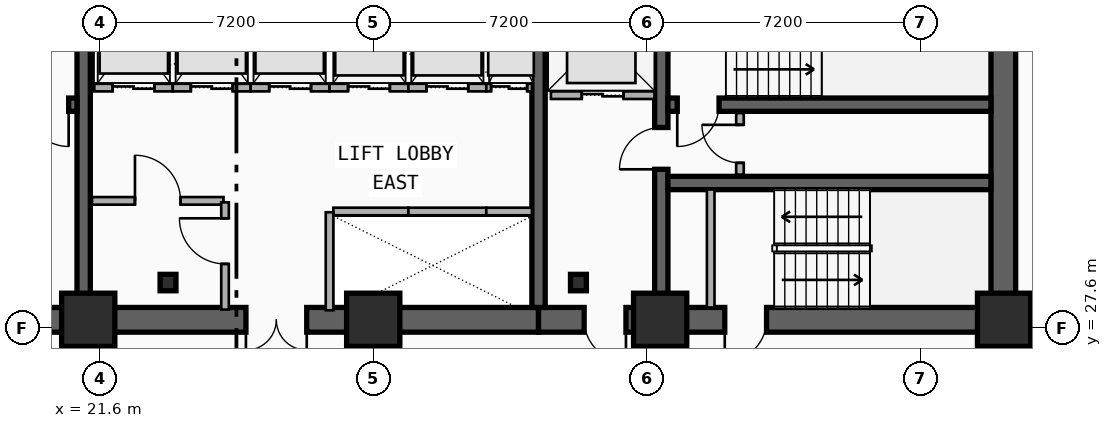
"""IFC4 building model, lengths in metres.
Left out: names, types, materials, properties, quantities, classifications, styles, units other than length and angle.
Written with IfcOpenShell. Run it as: python <this file> out.ifc"""

import sys

from ifc_helpers import new_model, si_unit, direction, frame, frame_2d, origin, origin_2d, place, context, subcontext, project, spatial, rectangle, i_section, extrude, element, fill, save


model = new_model("IFC4")
c1 = context("Model", 3, precision=1e-05, world=origin(), true_north=direction((0.0, 1.0)))
c2 = subcontext(c1, "Body", "Model", "MODEL_VIEW")
j1 = project(units=[si_unit("LENGTHUNIT", "METRE"), si_unit("PLANEANGLEUNIT", "RADIAN")], contexts=[c1])
p1 = place(None, origin())
s1 = spatial("IfcSite", under=j1, at=p1, CompositionType="ELEMENT")
p2 = place(p1, origin())
s2 = spatial("IfcBuilding", under=s1, at=p2, CompositionType="ELEMENT")
p3 = place(p2, frame((0.0, 0.0, 86.3)))
s3 = spatial("IfcBuildingStorey", under=s2, at=p3, CompositionType="ELEMENT", Elevation=86.3)
p4 = place(p3, frame((21.18, 27.82, 0.0), z_axis=(0.0, 0.0, 1.0), x_axis=(-1.0, 0.0, 0.0)))
e1 = element("IfcWall", 1, at=p4, inside=s3, PredefinedType="SHEAR", context=c2, shape_type="SweptSolid", body=[
    extrude(rectangle(XDim=9.03, YDim=0.65, at=frame_2d((4.515, 0.0))), origin(), (0.0, 0.0, 1.0), 3.5),
])
p5 = place(p4, frame((2.68, 0.0, 0.0)))
e2 = element("IfcOpeningElement", 2, at=p5, cuts=e1, PredefinedType="OPENING", context=c2, shape_type="SweptSolid", body=[
    extrude(rectangle(XDim=1.1, YDim=2.15, at=frame_2d((0.55, 1.075))), frame((0.0, 0.335, 0.0), z_axis=(0.0, -1.0, 0.0), x_axis=(1.0, 0.0, 0.0)), (0.0, 0.0, 1.0), 0.67),
])
p6 = place(p3, frame((33.15, 27.82, 0.0), z_axis=(0.0, 0.0, 1.0), x_axis=(-1.0, 0.0, 0.0)))
e3 = element("IfcWall", 3, at=p6, inside=s3, PredefinedType="SHEAR", context=c2, shape_type="SweptSolid", body=[
    extrude(rectangle(XDim=11.97, YDim=0.65, at=frame_2d((5.985, 0.0))), origin(), (0.0, 0.0, 1.0), 3.5),
])
p7 = place(p6, frame((6.1, 0.0, 0.0)))
e4 = element("IfcOpeningElement", 4, at=p7, cuts=e3, PredefinedType="OPENING", context=c2, shape_type="SweptSolid", body=[
    extrude(rectangle(XDim=1.6, YDim=2.2, at=frame_2d((0.8, 1.1))), frame((0.0, 0.335, 0.0), z_axis=(0.0, -1.0, 0.0), x_axis=(1.0, 0.0, 0.0)), (0.0, 0.0, 1.0), 0.67),
])
p8 = place(p3, frame((45.38, 27.82, 0.0), z_axis=(0.0, 0.0, 1.0), x_axis=(-1.0, 0.0, 0.0)))
e5 = element("IfcWall", 5, at=p8, inside=s3, PredefinedType="SHEAR", context=c2, shape_type="SweptSolid", body=[
    extrude(rectangle(XDim=12.23, YDim=0.65, at=frame_2d((6.115, 0.0))), origin(), (0.0, 0.0, 1.0), 3.5),
])
p9 = place(p8, frame((9.93, 0.0, 0.0)))
e6 = element("IfcOpeningElement", 6, at=p9, cuts=e5, PredefinedType="OPENING", context=c2, shape_type="SweptSolid", body=[
    extrude(rectangle(XDim=1.1, YDim=2.15, at=frame_2d((0.55, 1.075))), frame((0.0, 0.335, 0.0), z_axis=(0.0, -1.0, 0.0), x_axis=(1.0, 0.0, 0.0)), (0.0, 0.0, 1.0), 0.67),
])
p10 = place(p8, frame((6.23, 0.0, 0.0)))
e7 = element("IfcOpeningElement", 7, at=p10, cuts=e5, PredefinedType="OPENING", context=c2, shape_type="SweptSolid", body=[
    extrude(rectangle(XDim=1.1, YDim=2.15, at=frame_2d((0.55, 1.075))), frame((0.0, 0.335, 0.0), z_axis=(0.0, -1.0, 0.0), x_axis=(1.0, 0.0, 0.0)), (0.0, 0.0, 1.0), 0.67),
])
p11 = place(p3, frame((45.38, 28.145, 0.0), z_axis=(0.0, 0.0, 1.0), x_axis=(0.0, 1.0, 0.0)))
e8 = element("IfcWall", 8, at=p11, inside=s3, PredefinedType="SHEAR", context=c2, shape_type="SweptSolid", body=[
    extrude(rectangle(XDim=8.58, YDim=0.65, at=frame_2d((4.29, 0.0))), origin(), (0.0, 0.0, 1.0), 3.5),
])
for number, where, z_axis, x_axis in (
    (9, (21.18, 28.145, 0.0), (0.0, 0.0, 1.0), (0.0, 1.0, 0.0)),
    (10, (33.15, 28.145, 0.0), (0.0, 0.0, 1.0), (0.0, 1.0, 0.0)),
):
    element("IfcWall", number, at=place(p3, frame(where, z_axis=z_axis, x_axis=x_axis)), inside=s3, PredefinedType="SHEAR", context=c2, shape_type="SweptSolid", body=[
        extrude(rectangle(XDim=8.58, YDim=0.35, at=frame_2d((4.29, 0.0))), origin(), (0.0, 0.0, 1.0), 3.5),
    ])
p12 = place(p3, frame((36.38, 28.145, 0.0), z_axis=(0.0, 0.0, 1.0), x_axis=(0.0, 1.0, 0.0)))
e11 = element("IfcWall", 11, at=p12, inside=s3, PredefinedType="SHEAR", context=c2, shape_type="SweptSolid", body=[
    extrude(rectangle(XDim=8.58, YDim=0.35, at=frame_2d((4.29, 0.0))), origin(), (0.0, 0.0, 1.0), 3.5),
])
p13 = place(p12, frame((3.635, 0.0, 0.0)))
e12 = element("IfcOpeningElement", 12, at=p13, cuts=e11, PredefinedType="OPENING", context=c2, shape_type="SweptSolid", body=[
    extrude(rectangle(XDim=1.1, YDim=2.15, at=frame_2d((0.55, 1.075))), frame((0.0, 0.185, 0.0), z_axis=(0.0, -1.0, 0.0), x_axis=(1.0, 0.0, 0.0)), (0.0, 0.0, 1.0), 0.37),
])
p14 = place(p3, frame((21.005, 33.48, 0.0), z_axis=(0.0, 0.0, 1.0), x_axis=(-1.0, 0.0, 0.0)))
e13 = element("IfcWall", 13, at=p14, inside=s3, PredefinedType="SHEAR", context=c2, shape_type="SweptSolid", body=[
    extrude(rectangle(XDim=8.53, YDim=0.35, at=frame_2d((4.265, 0.0))), origin(), (0.0, 0.0, 1.0), 3.5),
])
p15 = place(p14, frame((0.22, 0.0, 0.0)))
e14 = element("IfcOpeningElement", 14, at=p15, cuts=e13, PredefinedType="OPENING", context=c2, shape_type="SweptSolid", body=[
    extrude(rectangle(XDim=1.1, YDim=2.15, at=frame_2d((0.55, 1.075))), frame((0.0, 0.185, 0.0), z_axis=(0.0, -1.0, 0.0), x_axis=(1.0, 0.0, 0.0)), (0.0, 0.0, 1.0), 0.37),
])
p16 = place(p3, frame((45.055, 33.48, 0.0), z_axis=(0.0, 0.0, 1.0), x_axis=(-1.0, 0.0, 0.0)))
e15 = element("IfcWall", 15, at=p16, inside=s3, PredefinedType="SHEAR", context=c2, shape_type="SweptSolid", body=[
    extrude(rectangle(XDim=8.5, YDim=0.35, at=frame_2d((4.25, 0.0))), origin(), (0.0, 0.0, 1.0), 3.5),
])
p17 = place(p16, frame((7.155, 0.0, 0.0)))
e16 = element("IfcOpeningElement", 16, at=p17, cuts=e15, PredefinedType="OPENING", context=c2, shape_type="SweptSolid", body=[
    extrude(rectangle(XDim=1.1, YDim=2.15, at=frame_2d((0.55, 1.075))), frame((0.0, 0.185, 0.0), z_axis=(0.0, -1.0, 0.0), x_axis=(1.0, 0.0, 0.0)), (0.0, 0.0, 1.0), 0.37),
])
p18 = place(p3, frame((36.555, 31.42, 0.0), z_axis=(0.0, 0.0, 1.0), x_axis=(1.0, 0.0, 0.0)))
e17 = element("IfcWall", 17, at=p18, inside=s3, PredefinedType="SHEAR", context=c2, shape_type="SweptSolid", body=[
    extrude(rectangle(XDim=8.5, YDim=0.35, at=frame_2d((4.25, 0.0))), origin(), (0.0, 0.0, 1.0), 3.5),
])
for number, where, z_axis, x_axis in (
    (18, (23.4, 28.8, 0.0), (0.0, 0.0, 1.0), (1.0, 0.0, 0.0)),
    (19, (34.2, 28.8, 0.0), (0.0, 0.0, 1.0), (1.0, 0.0, 0.0)),
):
    element("IfcColumn", number, at=place(p3, frame(where, z_axis=z_axis, x_axis=x_axis)), inside=s3, PredefinedType="COLUMN", context=c2, shape_type="SweptSolid", body=[
        extrude(i_section(OverallWidth=0.418, OverallDepth=0.432, WebThickness=0.035, FlangeThickness=0.056, FilletRadius=0.015, at=origin_2d()), origin(), (0.0, 0.0, 1.0), 3.5),
    ])
for number, where, z_axis, x_axis in (
    (20, (21.3, 27.82, 0.0), (0.0, 0.0, 1.0), (1.0, 0.0, 0.0)),
    (21, (28.8, 27.82, 0.0), (0.0, 0.0, 1.0), (1.0, 0.0, 0.0)),
    (22, (36.35, 27.82, 0.0), (0.0, 0.0, 1.0), (1.0, 0.0, 0.0)),
    (23, (45.4, 27.82, 0.0), (0.0, 0.0, 1.0), (1.0, 0.0, 0.0)),
):
    element("IfcColumn", number, at=place(p3, frame(where, z_axis=z_axis, x_axis=x_axis)), inside=s3, PredefinedType="COLUMN", context=c2, shape_type="SweptSolid", body=[
        extrude(rectangle(XDim=1.4, YDim=1.4, at=origin_2d()), origin(), (0.0, 0.0, 1.0), 3.5),
    ])
p19 = place(p3, frame((33.475, 33.73, 0.0), z_axis=(0.0, 0.0, 1.0), x_axis=(1.0, 0.0, 0.0)))
e24 = element("IfcWall", 24, at=p19, inside=s3, PredefinedType="PARTITIONING", context=c2, shape_type="SweptSolid", body=[
    extrude(rectangle(XDim=2.725, YDim=0.2, at=frame_2d((1.362, 0.0))), origin(), (0.0, 0.0, 1.0), 2.212),
])
p20 = place(p19, frame((0.812, 0.0, 0.0)))
e25 = element("IfcOpeningElement", 25, at=p20, cuts=e24, PredefinedType="OPENING", context=c2, shape_type="SweptSolid", body=[
    extrude(rectangle(XDim=1.1, YDim=2.15, at=frame_2d((0.55, 1.075))), frame((0.0, 0.11, 0.0), z_axis=(0.0, -1.0, 0.0), x_axis=(1.0, 0.0, 0.0)), (0.0, 0.0, 1.0), 0.22),
])
p21 = place(p3, frame((27.75, 30.67, 0.0), z_axis=(0.0, 0.0, 1.0), x_axis=(1.0, 0.0, 0.0)))
e26 = element("IfcWall", 26, at=p21, inside=s3, PredefinedType="PARTITIONING", context=c2, shape_type="SweptSolid", body=[
    extrude(rectangle(XDim=1.975, YDim=0.2, at=frame_2d((0.988, 0.0))), origin(), (0.0, 0.0, 1.0), 2.212),
])
p22 = place(p3, frame((27.65, 28.07, 0.0), z_axis=(0.0, 0.0, 1.0), x_axis=(0.0, 1.0, 0.0)))
e27 = element("IfcWall", 27, at=p22, inside=s3, PredefinedType="PARTITIONING", context=c2, shape_type="SweptSolid", body=[
    extrude(rectangle(XDim=2.58, YDim=0.2, at=frame_2d((1.29, 0.0))), origin(), (0.0, 0.0, 1.0), 2.212),
])
p23 = place(p3, frame((29.725, 30.67, 0.0), z_axis=(0.0, 0.0, 1.0), x_axis=(1.0, 0.0, 0.0)))
e28 = element("IfcWall", 28, at=p23, inside=s3, PredefinedType="PARTITIONING", context=c2, shape_type="SweptSolid", body=[
    extrude(rectangle(XDim=2.05, YDim=0.2, at=frame_2d((1.025, 0.0))), origin(), (0.0, 0.0, 1.0), 2.62),
])
p24 = place(p3, frame((31.775, 30.67, 0.0), z_axis=(0.0, 0.0, 1.0), x_axis=(1.0, 0.0, 0.0)))
e29 = element("IfcWall", 29, at=p24, inside=s3, PredefinedType="PARTITIONING", context=c2, shape_type="SweptSolid", body=[
    extrude(rectangle(XDim=1.2, YDim=0.2, at=frame_2d((0.6, 0.0))), origin(), (0.0, 0.0, 1.0), 2.62),
])
p25 = place(p3, frame((21.46, 33.93, 0.0), z_axis=(0.0, 0.0, 1.0), x_axis=(1.0, 0.0, 0.0)))
e30 = element("IfcWall", 30, at=p25, inside=s3, PredefinedType="PARTITIONING", context=c2, shape_type="SweptSolid", body=[
    extrude(rectangle(XDim=2.065, YDim=0.2, at=frame_2d((1.032, 0.0))), origin(), (0.0, 0.0, 1.0), 2.212),
])
p26 = place(p25, frame((0.482, 0.0, 0.0)))
e31 = element("IfcOpeningElement", 31, at=p26, cuts=e30, PredefinedType="OPENING", context=c2, shape_type="SweptSolid", body=[
    extrude(rectangle(XDim=1.1, YDim=2.15, at=frame_2d((0.55, 1.075))), frame((0.0, 0.11, 0.0), z_axis=(0.0, -1.0, 0.0), x_axis=(1.0, 0.0, 0.0)), (0.0, 0.0, 1.0), 0.22),
])
p27 = place(p3, frame((23.525, 33.93, 0.0), z_axis=(0.0, 0.0, 1.0), x_axis=(1.0, 0.0, 0.0)))
e32 = element("IfcWall", 32, at=p27, inside=s3, PredefinedType="PARTITIONING", context=c2, shape_type="SweptSolid", body=[
    extrude(rectangle(XDim=2.05, YDim=0.2, at=frame_2d((1.025, 0.0))), origin(), (0.0, 0.0, 1.0), 3.24),
])
p28 = place(p27, frame((0.475, 0.0, 0.0)))
e33 = element("IfcOpeningElement", 33, at=p28, cuts=e32, PredefinedType="OPENING", context=c2, shape_type="SweptSolid", body=[
    extrude(rectangle(XDim=1.1, YDim=2.15, at=frame_2d((0.55, 1.075))), frame((0.0, 0.11, 0.0), z_axis=(0.0, -1.0, 0.0), x_axis=(1.0, 0.0, 0.0)), (0.0, 0.0, 1.0), 0.22),
])
p29 = place(p3, frame((25.575, 33.93, 0.0), z_axis=(0.0, 0.0, 1.0), x_axis=(1.0, 0.0, 0.0)))
e34 = element("IfcWall", 34, at=p29, inside=s3, PredefinedType="PARTITIONING", context=c2, shape_type="SweptSolid", body=[
    extrude(rectangle(XDim=2.075, YDim=0.2, at=frame_2d((1.038, 0.0))), origin(), (0.0, 0.0, 1.0), 3.24),
])
p30 = place(p29, frame((0.488, 0.0, 0.0)))
e35 = element("IfcOpeningElement", 35, at=p30, cuts=e34, PredefinedType="OPENING", context=c2, shape_type="SweptSolid", body=[
    extrude(rectangle(XDim=1.1, YDim=2.15, at=frame_2d((0.55, 1.075))), frame((0.0, 0.11, 0.0), z_axis=(0.0, -1.0, 0.0), x_axis=(1.0, 0.0, 0.0)), (0.0, 0.0, 1.0), 0.22),
])
p31 = place(p3, frame((27.65, 33.93, 0.0), z_axis=(0.0, 0.0, 1.0), x_axis=(1.0, 0.0, 0.0)))
e36 = element("IfcWall", 36, at=p31, inside=s3, PredefinedType="PARTITIONING", context=c2, shape_type="SweptSolid", body=[
    extrude(rectangle(XDim=2.075, YDim=0.2, at=frame_2d((1.038, 0.0))), origin(), (0.0, 0.0, 1.0), 2.212),
])
p32 = place(p31, frame((0.488, 0.0, 0.0)))
e37 = element("IfcOpeningElement", 37, at=p32, cuts=e36, PredefinedType="OPENING", context=c2, shape_type="SweptSolid", body=[
    extrude(rectangle(XDim=1.1, YDim=2.15, at=frame_2d((0.55, 1.075))), frame((0.0, 0.11, 0.0), z_axis=(0.0, -1.0, 0.0), x_axis=(1.0, 0.0, 0.0)), (0.0, 0.0, 1.0), 0.22),
])
p33 = place(p3, frame((29.725, 33.93, 0.0), z_axis=(0.0, 0.0, 1.0), x_axis=(1.0, 0.0, 0.0)))
e38 = element("IfcWall", 38, at=p33, inside=s3, PredefinedType="PARTITIONING", context=c2, shape_type="SweptSolid", body=[
    extrude(rectangle(XDim=2.05, YDim=0.2, at=frame_2d((1.025, 0.0))), origin(), (0.0, 0.0, 1.0), 3.24),
])
p34 = place(p33, frame((0.475, 0.0, 0.0)))
e39 = element("IfcOpeningElement", 39, at=p34, cuts=e38, PredefinedType="OPENING", context=c2, shape_type="SweptSolid", body=[
    extrude(rectangle(XDim=1.1, YDim=2.15, at=frame_2d((0.55, 1.075))), frame((0.0, 0.11, 0.0), z_axis=(0.0, -1.0, 0.0), x_axis=(1.0, 0.0, 0.0)), (0.0, 0.0, 1.0), 0.22),
])
p35 = place(p3, frame((31.775, 33.93, 0.0), z_axis=(0.0, 0.0, 1.0), x_axis=(1.0, 0.0, 0.0)))
e40 = element("IfcWall", 40, at=p35, inside=s3, PredefinedType="PARTITIONING", context=c2, shape_type="SweptSolid", body=[
    extrude(rectangle(XDim=1.2, YDim=0.2, at=frame_2d((0.6, 0.0))), origin(), (0.0, 0.0, 1.0), 3.24),
])
p36 = place(p35, frame((0.125, 0.0, 0.0)))
e41 = element("IfcOpeningElement", 41, at=p36, cuts=e40, PredefinedType="OPENING", context=c2, shape_type="SweptSolid", body=[
    extrude(rectangle(XDim=0.95, YDim=2.15, at=frame_2d((0.475, 1.075))), frame((0.0, 0.11, 0.0), z_axis=(0.0, -1.0, 0.0), x_axis=(1.0, 0.0, 0.0)), (0.0, 0.0, 1.0), 0.22),
])
p37 = place(p3, frame((37.68, 28.145, 0.0), z_axis=(0.0, 0.0, 1.0), x_axis=(0.0, 1.0, 0.0)))
e42 = element("IfcWall", 42, at=p37, inside=s3, PredefinedType="PARTITIONING", context=c2, shape_type="SweptSolid", body=[
    extrude(rectangle(XDim=3.105, YDim=0.2, at=frame_2d((1.552, 0.0))), origin(), (0.0, 0.0, 1.0), 2.62),
])
p38 = place(p3, frame((38.45, 31.64, 0.0), z_axis=(0.0, 0.0, 1.0), x_axis=(0.0, 1.0, 0.0)))
e43 = element("IfcWall", 43, at=p38, inside=s3, PredefinedType="PARTITIONING", context=c2, shape_type="SweptSolid", body=[
    extrude(rectangle(XDim=1.62, YDim=0.2, at=frame_2d((0.81, 0.0))), origin(), (0.0, 0.0, 1.0), 3.24),
])
p39 = place(p38, frame((0.31, 0.0, 0.0)))
e44 = element("IfcOpeningElement", 44, at=p39, cuts=e43, PredefinedType="OPENING", context=c2, shape_type="SweptSolid", body=[
    extrude(rectangle(XDim=1.0, YDim=2.15, at=frame_2d((0.5, 1.075))), frame((0.0, 0.11, 0.0), z_axis=(0.0, -1.0, 0.0), x_axis=(1.0, 0.0, 0.0)), (0.0, 0.0, 1.0), 0.22),
])
p40 = place(p3, frame((21.4, 30.95, 0.0), z_axis=(0.0, 0.0, 1.0), x_axis=(1.0, 0.0, 0.0)))
e45 = element("IfcWall", 45, at=p40, inside=s3, PredefinedType="PARTITIONING", context=c2, shape_type="SweptSolid", body=[
    extrude(rectangle(XDim=3.46, YDim=0.2, at=frame_2d((1.73, 0.0))), origin(), (0.0, 0.0, 1.0), 2.28),
])
p41 = place(p40, frame((1.13, 0.0, 0.0)))
e46 = element("IfcOpeningElement", 46, at=p41, cuts=e45, PredefinedType="OPENING", context=c2, shape_type="SweptSolid", body=[
    extrude(rectangle(XDim=1.2, YDim=2.15, at=frame_2d((0.6, 1.075))), frame((0.0, 0.11, 0.0), z_axis=(0.0, -1.0, 0.0), x_axis=(1.0, 0.0, 0.0)), (0.0, 0.0, 1.0), 0.22),
])
p42 = place(p3, frame((24.9, 28.09, 0.0), z_axis=(0.0, 0.0, 1.0), x_axis=(0.0, 1.0, 0.0)))
e47 = element("IfcWall", 47, at=p42, inside=s3, PredefinedType="PARTITIONING", context=c2, shape_type="SweptSolid", body=[
    extrude(rectangle(XDim=2.82, YDim=0.2, at=frame_2d((1.41, 0.0))), origin(), (0.0, 0.0, 1.0), 2.62),
])
p43 = place(p42, frame((1.201, 0.0, 0.0)))
e48 = element("IfcOpeningElement", 48, at=p43, cuts=e47, PredefinedType="OPENING", context=c2, shape_type="SweptSolid", body=[
    extrude(rectangle(XDim=1.2, YDim=2.15, at=frame_2d((0.6, 1.075))), frame((0.0, 0.11, 0.0), z_axis=(0.0, -1.0, 0.0), x_axis=(1.0, 0.0, 0.0)), (0.0, 0.0, 1.0), 0.22),
])
p44 = place(p3, frame((45.41, 27.6, 0.0), z_axis=(0.0, 0.0, 1.0), x_axis=(1.0, 0.0, 0.0)))
e49 = element("IfcWall", 49, at=p44, inside=s3, PredefinedType="PARTITIONING", context=c2, shape_type="SweptSolid", body=[
    extrude(rectangle(XDim=0.91, YDim=0.16, at=frame_2d((0.455, 0.0))), origin(), (0.0, 0.0, 1.0), 2.28),
])
p45 = place(p20, origin())
e50 = element("IfcDoor", 50, at=p45, inside=s3, OperationType="DOUBLE_DOOR_SLIDING", PredefinedType="DOOR", context=c2, shape_type="SweptSolid", body=[
    extrude(rectangle(XDim=1.1, YDim=2.15, at=frame_2d((0.55, 1.075))), frame((0.0, 0.025, 0.0), z_axis=(0.0, -1.0, 0.0), x_axis=(1.0, 0.0, 0.0)), (0.0, 0.0, 1.0), 0.05),
])
fill(e25, e50)
p46 = place(p26, origin())
e51 = element("IfcDoor", 51, at=p46, inside=s3, OperationType="DOUBLE_DOOR_SLIDING", PredefinedType="DOOR", context=c2, shape_type="SweptSolid", body=[
    extrude(rectangle(XDim=1.1, YDim=2.15, at=frame_2d((0.55, 1.075))), frame((0.0, 0.025, 0.0), z_axis=(0.0, -1.0, 0.0), x_axis=(1.0, 0.0, 0.0)), (0.0, 0.0, 1.0), 0.05),
])
fill(e31, e51)
p47 = place(p28, origin())
e52 = element("IfcDoor", 52, at=p47, inside=s3, OperationType="DOUBLE_DOOR_SLIDING", PredefinedType="DOOR", context=c2, shape_type="SweptSolid", body=[
    extrude(rectangle(XDim=1.1, YDim=2.15, at=frame_2d((0.55, 1.075))), frame((0.0, 0.025, 0.0), z_axis=(0.0, -1.0, 0.0), x_axis=(1.0, 0.0, 0.0)), (0.0, 0.0, 1.0), 0.05),
])
fill(e33, e52)
p48 = place(p30, origin())
e53 = element("IfcDoor", 53, at=p48, inside=s3, OperationType="DOUBLE_DOOR_SLIDING", PredefinedType="DOOR", context=c2, shape_type="SweptSolid", body=[
    extrude(rectangle(XDim=1.1, YDim=2.15, at=frame_2d((0.55, 1.075))), frame((0.0, 0.025, 0.0), z_axis=(0.0, -1.0, 0.0), x_axis=(1.0, 0.0, 0.0)), (0.0, 0.0, 1.0), 0.05),
])
fill(e35, e53)
p49 = place(p32, origin())
e54 = element("IfcDoor", 54, at=p49, inside=s3, OperationType="DOUBLE_DOOR_SLIDING", PredefinedType="DOOR", context=c2, shape_type="SweptSolid", body=[
    extrude(rectangle(XDim=1.1, YDim=2.15, at=frame_2d((0.55, 1.075))), frame((0.0, 0.025, 0.0), z_axis=(0.0, -1.0, 0.0), x_axis=(1.0, 0.0, 0.0)), (0.0, 0.0, 1.0), 0.05),
])
fill(e37, e54)
p50 = place(p34, origin())
e55 = element("IfcDoor", 55, at=p50, inside=s3, OperationType="DOUBLE_DOOR_SLIDING", PredefinedType="DOOR", context=c2, shape_type="SweptSolid", body=[
    extrude(rectangle(XDim=1.1, YDim=2.15, at=frame_2d((0.55, 1.075))), frame((0.0, 0.025, 0.0), z_axis=(0.0, -1.0, 0.0), x_axis=(1.0, 0.0, 0.0)), (0.0, 0.0, 1.0), 0.05),
])
fill(e39, e55)
p51 = place(p36, origin())
e56 = element("IfcDoor", 56, at=p51, inside=s3, OperationType="DOUBLE_DOOR_SLIDING", PredefinedType="DOOR", context=c2, shape_type="SweptSolid", body=[
    extrude(rectangle(XDim=0.95, YDim=2.15, at=frame_2d((0.475, 1.075))), frame((0.0, 0.025, 0.0), z_axis=(0.0, -1.0, 0.0), x_axis=(1.0, 0.0, 0.0)), (0.0, 0.0, 1.0), 0.05),
])
fill(e41, e56)
p52 = place(p15, origin())
e57 = element("IfcDoor", 57, at=p52, inside=s3, OperationType="SINGLE_SWING_LEFT", PredefinedType="DOOR", context=c2, shape_type="SweptSolid", body=[
    extrude(rectangle(XDim=1.1, YDim=2.15, at=frame_2d((0.55, 1.075))), frame((0.0, 0.025, 0.0), z_axis=(0.0, -1.0, 0.0), x_axis=(1.0, 0.0, 0.0)), (0.0, 0.0, 1.0), 0.05),
])
fill(e14, e57)
p53 = place(p17, origin())
e58 = element("IfcDoor", 58, at=p53, inside=s3, OperationType="SINGLE_SWING_RIGHT", PredefinedType="DOOR", context=c2, shape_type="SweptSolid", body=[
    extrude(rectangle(XDim=1.1, YDim=2.15, at=frame_2d((0.55, 1.075))), frame((0.0, 0.025, 0.0), z_axis=(0.0, -1.0, 0.0), x_axis=(1.0, 0.0, 0.0)), (0.0, 0.0, 1.0), 0.05),
])
fill(e16, e58)
p54 = place(p13, origin())
e59 = element("IfcDoor", 59, at=p54, inside=s3, OperationType="SINGLE_SWING_LEFT", PredefinedType="DOOR", context=c2, shape_type="SweptSolid", body=[
    extrude(rectangle(XDim=1.1, YDim=2.15, at=frame_2d((0.55, 1.075))), frame((0.0, 0.025, 0.0), z_axis=(0.0, -1.0, 0.0), x_axis=(1.0, 0.0, 0.0)), (0.0, 0.0, 1.0), 0.05),
])
fill(e12, e59)
p55 = place(p9, origin())
e60 = element("IfcDoor", 60, at=p55, inside=s3, OperationType="SINGLE_SWING_LEFT", PredefinedType="DOOR", context=c2, shape_type="SweptSolid", body=[
    extrude(rectangle(XDim=1.1, YDim=2.15, at=frame_2d((0.55, 1.075))), frame((0.0, 0.025, 0.0), z_axis=(0.0, -1.0, 0.0), x_axis=(1.0, 0.0, 0.0)), (0.0, 0.0, 1.0), 0.05),
])
fill(e6, e60)
p56 = place(p10, origin())
e61 = element("IfcDoor", 61, at=p56, inside=s3, OperationType="SINGLE_SWING_RIGHT", PredefinedType="DOOR", context=c2, shape_type="SweptSolid", body=[
    extrude(rectangle(XDim=1.1, YDim=2.15, at=frame_2d((0.55, 1.075))), frame((0.0, 0.025, 0.0), z_axis=(0.0, -1.0, 0.0), x_axis=(1.0, 0.0, 0.0)), (0.0, 0.0, 1.0), 0.05),
])
fill(e7, e61)
p57 = place(p7, origin())
e62 = element("IfcDoor", 62, at=p57, inside=s3, OperationType="SINGLE_SWING_LEFT", PredefinedType="DOOR", context=c2, shape_type="SweptSolid", body=[
    extrude(rectangle(XDim=1.6, YDim=2.2, at=frame_2d((0.8, 1.1))), frame((0.0, 0.025, 0.0), z_axis=(0.0, -1.0, 0.0), x_axis=(1.0, 0.0, 0.0)), (0.0, 0.0, 1.0), 0.05),
])
fill(e4, e62)
p58 = place(p39, origin())
e63 = element("IfcDoor", 63, at=p58, inside=s3, OperationType="SINGLE_SWING_RIGHT", PredefinedType="DOOR", context=c2, shape_type="SweptSolid", body=[
    extrude(rectangle(XDim=1.0, YDim=2.15, at=frame_2d((0.5, 1.075))), frame((0.0, 0.025, 0.0), z_axis=(0.0, -1.0, 0.0), x_axis=(1.0, 0.0, 0.0)), (0.0, 0.0, 1.0), 0.05),
])
fill(e44, e63)
p59 = place(p41, origin())
e64 = element("IfcDoor", 64, at=p59, inside=s3, OperationType="SINGLE_SWING_LEFT", PredefinedType="DOOR", context=c2, shape_type="SweptSolid", body=[
    extrude(rectangle(XDim=1.2, YDim=2.15, at=frame_2d((0.6, 1.075))), frame((0.0, 0.025, 0.0), z_axis=(0.0, -1.0, 0.0), x_axis=(1.0, 0.0, 0.0)), (0.0, 0.0, 1.0), 0.05),
])
fill(e46, e64)
p60 = place(p43, origin())
e65 = element("IfcDoor", 65, at=p60, inside=s3, OperationType="SINGLE_SWING_RIGHT", PredefinedType="DOOR", context=c2, shape_type="SweptSolid", body=[
    extrude(rectangle(XDim=1.2, YDim=2.15, at=frame_2d((0.6, 1.075))), frame((0.0, 0.025, 0.0), z_axis=(0.0, -1.0, 0.0), x_axis=(1.0, 0.0, 0.0)), (0.0, 0.0, 1.0), 0.05),
])
fill(e48, e65)
save(model, sys.argv[1])
